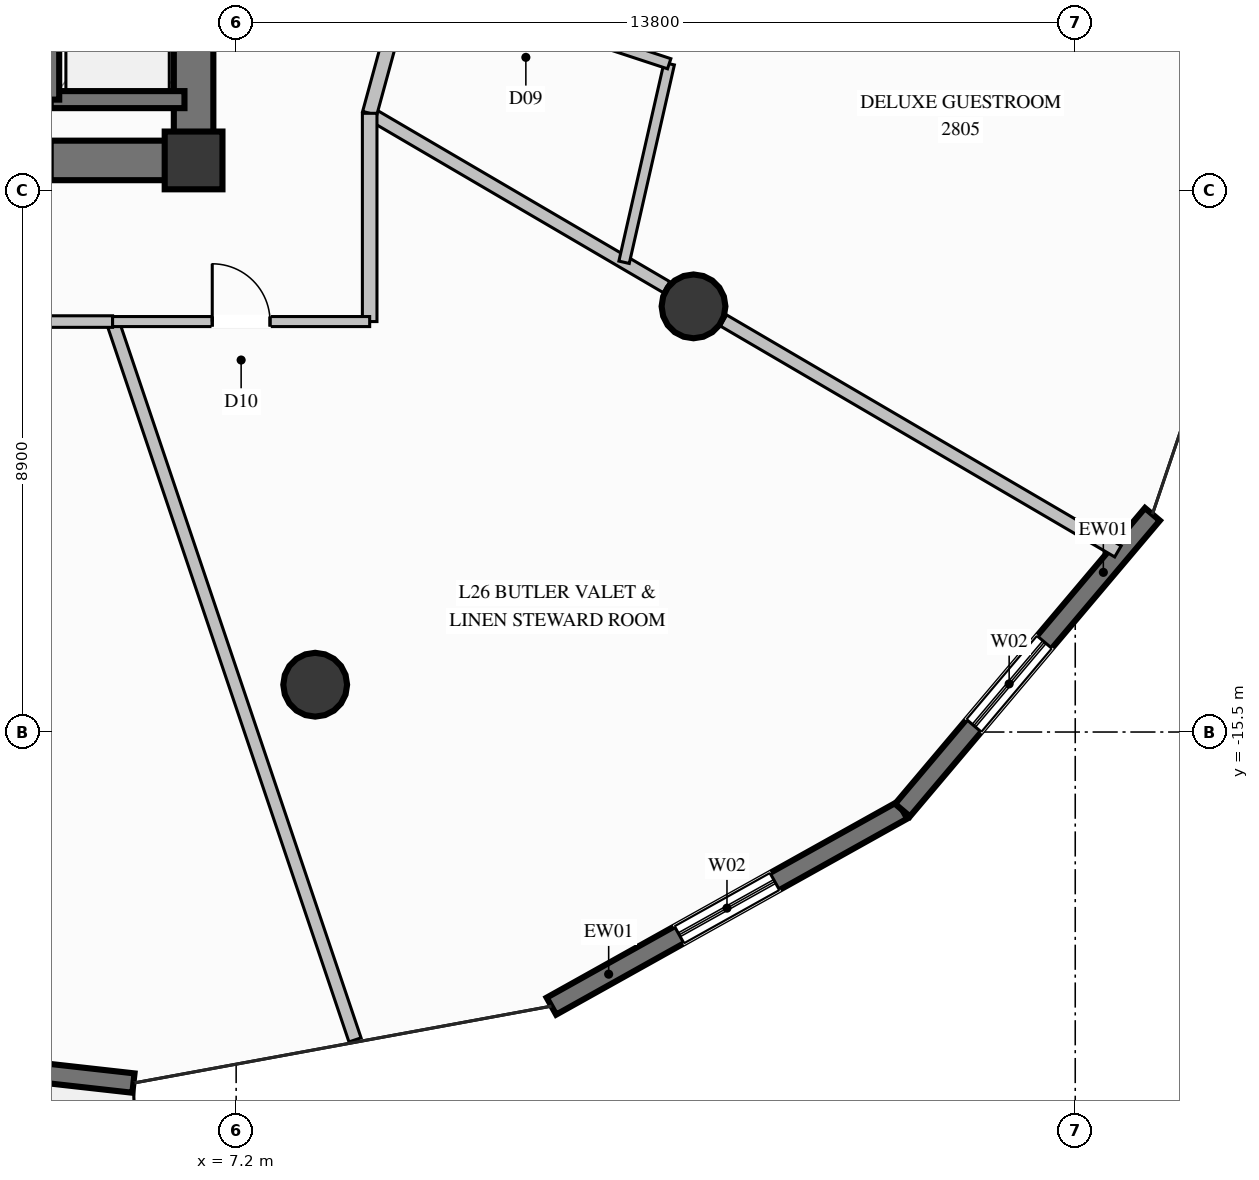
"""IFC4 building model, lengths in metres.
Left out: names, types, materials, properties, quantities, classifications, styles, units other than length and angle.
Written with IfcOpenShell. Run it as: python <this file> out.ifc"""

import sys

from ifc_helpers import new_model, si_unit, direction, frame, frame_2d, origin, origin_2d, place, context, subcontext, project, spatial, rectangle, circle, extrude, element, fill, save


model = new_model("IFC4")
c1 = context("Model", 3, precision=1e-05, world=origin(), true_north=direction((0.0, 1.0)))
c2 = subcontext(c1, "Body", "Model", "MODEL_VIEW")
j1 = project(units=[si_unit("LENGTHUNIT", "METRE"), si_unit("PLANEANGLEUNIT", "RADIAN")], contexts=[c1])
p1 = place(None, origin())
s1 = spatial("IfcSite", under=j1, at=p1, CompositionType="ELEMENT")
p2 = place(p1, origin())
s2 = spatial("IfcBuilding", under=s1, at=p2, CompositionType="ELEMENT")
p3 = place(p2, frame((0.0, 0.0, 106.2)))
s3 = spatial("IfcBuildingStorey", under=s2, at=p3, CompositionType="ELEMENT", Elevation=106.2)
p4 = place(p3, frame((6.5, -6.1, 0.0), z_axis=(0.0, 0.0, 1.0), x_axis=(1.0, 0.0, 0.0)))
e1 = element("IfcColumn", 1, at=p4, inside=s3, PredefinedType="COLUMN", context=c2, shape_type="SweptSolid", body=[
    extrude(rectangle(XDim=0.95, YDim=0.95, at=origin_2d()), origin(), (0.0, 0.0, 1.0), 3.6),
])
p5 = place(p3, frame((4.15, -6.1, 0.0), z_axis=(0.0, 0.0, 1.0), x_axis=(1.0, 0.0, 0.0)))
e2 = element("IfcWall", 2, at=p5, inside=s3, PredefinedType="SHEAR", context=c2, shape_type="SweptSolid", body=[
    extrude(rectangle(XDim=2.025, YDim=0.65, at=frame_2d((1.013, 0.0))), origin(), (0.0, 0.0, 1.0), 3.6),
])
p6 = place(p3, frame((6.5, -6.425, 0.0), z_axis=(0.0, 0.0, 1.0), x_axis=(0.0, 1.0, 0.0)))
e3 = element("IfcWall", 3, at=p6, inside=s3, PredefinedType="SHEAR", context=c2, shape_type="SweptSolid", body=[
    extrude(rectangle(XDim=4.075, YDim=0.65, at=frame_2d((2.038, 0.0))), origin(), (0.0, 0.0, 1.0), 3.6),
])
for number, where, z_axis, x_axis in (
    (4, (8.5, -14.722, 0.0), (0.0, 0.0, 1.0), (1.0, 0.0, 0.0)),
    (5, (14.722, -8.5, 0.0), (0.0, 0.0, 1.0), (1.0, 0.0, 0.0)),
):
    element("IfcColumn", number, at=place(p3, frame(where, z_axis=z_axis, x_axis=x_axis)), inside=s3, PredefinedType="COLUMN", context=c2, shape_type="SweptSolid", body=[
        extrude(circle(Radius=0.525, at=origin_2d()), origin(), (0.0, 0.0, 1.0), 3.6),
    ])
p7 = place(p3, frame((5.511, -21.273, 0.0), z_axis=(0.0, 0.0, 1.0), x_axis=(-0.993784044115, 0.111325081016, 0.0)))
e6 = element("IfcWall", 6, at=p7, inside=s3, PredefinedType="SOLIDWALL", context=c2, shape_type="SweptSolid", body=[
    extrude(rectangle(XDim=7.347, YDim=0.32, at=frame_2d((3.673, 0.0))), origin(), (0.0, 0.0, 1.0), 3.35),
])
p8 = place(p7, frame((2.773, 0.0, 0.35)))
e7 = element("IfcOpeningElement", 7, at=p8, cuts=e6, PredefinedType="OPENING", context=c2, shape_type="SweptSolid", body=[
    extrude(rectangle(XDim=1.8, YDim=2.6, at=frame_2d((0.9, 1.3))), frame((0.0, 0.17, 0.0), z_axis=(0.0, -1.0, 0.0), x_axis=(1.0, 0.0, 0.0)), (0.0, 0.0, 1.0), 0.34),
])
p9 = place(p3, frame((18.159, -16.785, 0.0), z_axis=(0.0, 0.0, 1.0), x_axis=(-0.873166276034, -0.487422459882, 0.0)))
e8 = element("IfcWall", 8, at=p9, inside=s3, PredefinedType="SOLIDWALL", context=c2, shape_type="SweptSolid", body=[
    extrude(rectangle(XDim=6.613, YDim=0.32, at=frame_2d((3.306, 0.0))), origin(), (0.0, 0.0, 1.0), 3.35),
])
p10 = place(p9, frame((2.406, 0.0, 0.35)))
e9 = element("IfcOpeningElement", 9, at=p10, cuts=e8, PredefinedType="OPENING", context=c2, shape_type="SweptSolid", body=[
    extrude(rectangle(XDim=1.8, YDim=2.6, at=frame_2d((0.9, 1.3))), frame((0.0, 0.17, 0.0), z_axis=(0.0, -1.0, 0.0), x_axis=(1.0, 0.0, 0.0)), (0.0, 0.0, 1.0), 0.34),
])
p11 = place(p3, frame((22.269, -11.919, 0.0), z_axis=(0.0, 0.0, 1.0), x_axis=(-0.645278763483, -0.763947195425, 0.0)))
e10 = element("IfcWall", 10, at=p11, inside=s3, PredefinedType="SOLIDWALL", context=c2, shape_type="SweptSolid", body=[
    extrude(rectangle(XDim=6.369, YDim=0.32, at=frame_2d((3.185, 0.0))), origin(), (0.0, 0.0, 1.0), 3.35),
])
p12 = place(p11, frame((2.751, 0.0, 0.35)))
e11 = element("IfcOpeningElement", 11, at=p12, cuts=e10, PredefinedType="OPENING", context=c2, shape_type="SweptSolid", body=[
    extrude(rectangle(XDim=1.8, YDim=2.6, at=frame_2d((0.9, 1.3))), frame((0.0, 0.17, 0.0), z_axis=(0.0, -1.0, 0.0), x_axis=(1.0, 0.0, 0.0)), (0.0, 0.0, 1.0), 0.34),
])
p13 = place(p3, frame((4.15, -5.1, 0.0), z_axis=(0.0, 0.0, 1.0), x_axis=(1.0, 0.0, 0.0)))
e12 = element("IfcWall", 12, at=p13, inside=s3, PredefinedType="SOLIDWALL", context=c2, shape_type="SweptSolid", body=[
    extrude(rectangle(XDim=2.2, YDim=0.28, at=frame_2d((1.1, 0.0))), origin(), (0.0, 0.0, 1.0), 3.35),
])
p14 = place(p3, frame((4.15, -2.4, 0.0), z_axis=(0.0, 0.0, 1.0), x_axis=(0.0, -1.0, 0.0)))
e13 = element("IfcWall", 13, at=p14, inside=s3, PredefinedType="SOLIDWALL", context=c2, shape_type="SweptSolid", body=[
    extrude(rectangle(XDim=2.7, YDim=0.28, at=frame_2d((1.35, 0.0))), origin(), (0.0, 0.0, 1.0), 3.35),
])
p15 = place(p3, frame((9.396, -5.325, 0.0), z_axis=(0.0, 0.0, 1.0), x_axis=(0.862912125579, -0.505353998232, 0.0)))
e14 = element("IfcWall", 14, at=p15, inside=s3, PredefinedType="PARTITIONING", context=c2, shape_type="SweptSolid", body=[
    extrude(rectangle(XDim=5.658, YDim=0.21, at=frame_2d((2.829, 0.0))), origin(), (0.0, 0.0, 1.0), 2.719),
])
p16 = place(p3, frame((15.215, -8.732, 0.0), z_axis=(0.0, 0.0, 1.0), x_axis=(0.862960241997, -0.505271828556, 0.0)))
e15 = element("IfcWall", 15, at=p16, inside=s3, PredefinedType="PARTITIONING", context=c2, shape_type="SweptSolid", body=[
    extrude(rectangle(XDim=7.517, YDim=0.21, at=frame_2d((3.758, 0.0))), origin(), (0.0, 0.0, 1.0), 3.35),
])
p17 = place(p3, frame((9.396, -5.325, 0.0), z_axis=(0.0, 0.0, 1.0), x_axis=(0.263643210908, 0.964620265878, 0.0)))
e16 = element("IfcWall", 16, at=p17, inside=s3, PredefinedType="PARTITIONING", context=c2, shape_type="SweptSolid", body=[
    extrude(rectangle(XDim=2.318, YDim=0.24, at=frame_2d((1.159, 0.0))), origin(), (0.0, 0.0, 1.0), 3.35),
])
p18 = place(p3, frame((13.58, -7.775, 0.0), z_axis=(0.0, 0.0, 1.0), x_axis=(0.221599041774, 0.975137869578, 0.0)))
e17 = element("IfcWall", 17, at=p18, inside=s3, PredefinedType="PLUMBINGWALL", context=c2, shape_type="SweptSolid", body=[
    extrude(rectangle(XDim=3.348, YDim=0.175, at=frame_2d((1.674, 0.0))), origin(), (0.0, 0.0, 1.0), 3.35),
])
p19 = place(p3, frame((10.007, -3.089, 0.0), z_axis=(0.0, 0.0, 1.0), x_axis=(0.949827092004, -0.312775471057, 0.0)))
e18 = element("IfcWall", 18, at=p19, inside=s3, PredefinedType="PLUMBINGWALL", context=c2, shape_type="SweptSolid", body=[
    extrude(rectangle(XDim=4.543, YDim=0.175, at=frame_2d((2.271, 0.0))), origin(), (0.0, 0.0, 1.0), 3.35),
])
p20 = place(p19, frame((1.821, 0.0, 0.0)))
e19 = element("IfcOpeningElement", 19, at=p20, cuts=e18, PredefinedType="OPENING", context=c2, shape_type="SweptSolid", body=[
    extrude(rectangle(XDim=0.9, YDim=2.1, at=frame_2d((0.45, 1.05))), frame((0.0, 0.098, 0.0), z_axis=(0.0, -1.0, 0.0), x_axis=(1.0, 0.0, 0.0)), (0.0, 0.0, 1.0), 0.195),
])
p21 = place(p3, frame((5.168, -8.75, 0.0), z_axis=(0.0, 0.0, 1.0), x_axis=(0.319791389232, -0.947487977429, 0.0)))
e20 = element("IfcWall", 20, at=p21, inside=s3, PredefinedType="PARTITIONING", context=c2, shape_type="SweptSolid", body=[
    extrude(rectangle(XDim=12.468, YDim=0.21, at=frame_2d((6.234, 0.0))), origin(), (0.0, 0.0, 1.0), 3.35),
])
p22 = place(p3, frame((0.0, -8.75, 0.0), z_axis=(0.0, 0.0, 1.0), x_axis=(1.0, 0.0, 0.0)))
e21 = element("IfcWall", 21, at=p22, inside=s3, PredefinedType="PARTITIONING", context=c2, shape_type="SweptSolid", body=[
    extrude(rectangle(XDim=5.168, YDim=0.19, at=frame_2d((2.584, 0.0))), origin(), (0.0, 0.0, 1.0), 3.35),
])
p23 = place(p22, frame((2.109, 0.0, 0.0)))
e22 = element("IfcOpeningElement", 22, at=p23, cuts=e21, PredefinedType="OPENING", context=c2, shape_type="SweptSolid", body=[
    extrude(rectangle(XDim=0.95, YDim=2.1, at=frame_2d((0.475, 1.05))), frame((0.0, 0.105, 0.0), z_axis=(0.0, -1.0, 0.0), x_axis=(1.0, 0.0, 0.0)), (0.0, 0.0, 1.0), 0.21),
])
p24 = place(p3, frame((9.396, -8.75, 0.0), z_axis=(0.0, 0.0, 1.0), x_axis=(0.0, 1.0, 0.0)))
e23 = element("IfcWall", 23, at=p24, inside=s3, PredefinedType="PARTITIONING", context=c2, shape_type="SweptSolid", body=[
    extrude(rectangle(XDim=3.425, YDim=0.24, at=frame_2d((1.712, 0.0))), origin(), (0.0, 0.0, 1.0), 3.35),
])
p25 = place(p3, frame((5.168, -8.75, 0.0), z_axis=(0.0, 0.0, 1.0), x_axis=(1.0, 0.0, 0.0)))
e24 = element("IfcWall", 24, at=p25, inside=s3, PredefinedType="PARTITIONING", context=c2, shape_type="SweptSolid", body=[
    extrude(rectangle(XDim=4.228, YDim=0.165, at=frame_2d((2.114, 0.0))), origin(), (0.0, 0.0, 1.0), 3.35),
])
p26 = place(p25, frame((1.639, 0.0, 0.0)))
e25 = element("IfcOpeningElement", 25, at=p26, cuts=e24, PredefinedType="OPENING", context=c2, shape_type="SweptSolid", body=[
    extrude(rectangle(XDim=0.95, YDim=2.1, at=frame_2d((0.475, 1.05))), frame((0.0, 0.093, 0.0), z_axis=(0.0, -1.0, 0.0), x_axis=(1.0, 0.0, 0.0)), (0.0, 0.0, 1.0), 0.185),
])
p27 = place(p10, origin())
e26 = element("IfcWindow", 26, at=p27, inside=s3, PartitioningType="SINGLE_PANEL", PredefinedType="WINDOW", context=c2, shape_type="SweptSolid", body=[
    extrude(rectangle(XDim=1.8, YDim=2.6, at=frame_2d((0.9, 1.3))), frame((0.0, 0.03, 0.0), z_axis=(0.0, -1.0, 0.0), x_axis=(1.0, 0.0, 0.0)), (0.0, 0.0, 1.0), 0.06),
])
fill(e9, e26)
p28 = place(p12, origin())
e27 = element("IfcWindow", 27, at=p28, inside=s3, PartitioningType="SINGLE_PANEL", PredefinedType="WINDOW", context=c2, shape_type="SweptSolid", body=[
    extrude(rectangle(XDim=1.8, YDim=2.6, at=frame_2d((0.9, 1.3))), frame((0.0, 0.03, 0.0), z_axis=(0.0, -1.0, 0.0), x_axis=(1.0, 0.0, 0.0)), (0.0, 0.0, 1.0), 0.06),
])
fill(e11, e27)
p29 = place(p26, origin())
e28 = element("IfcDoor", 28, at=p29, inside=s3, OperationType="SINGLE_SWING_LEFT", PredefinedType="DOOR", context=c2, shape_type="SweptSolid", body=[
    extrude(rectangle(XDim=0.95, YDim=2.1, at=frame_2d((0.475, 1.05))), frame((0.0, 0.025, 0.0), z_axis=(0.0, -1.0, 0.0), x_axis=(1.0, 0.0, 0.0)), (0.0, 0.0, 1.0), 0.05),
])
fill(e25, e28)
save(model, sys.argv[1])
